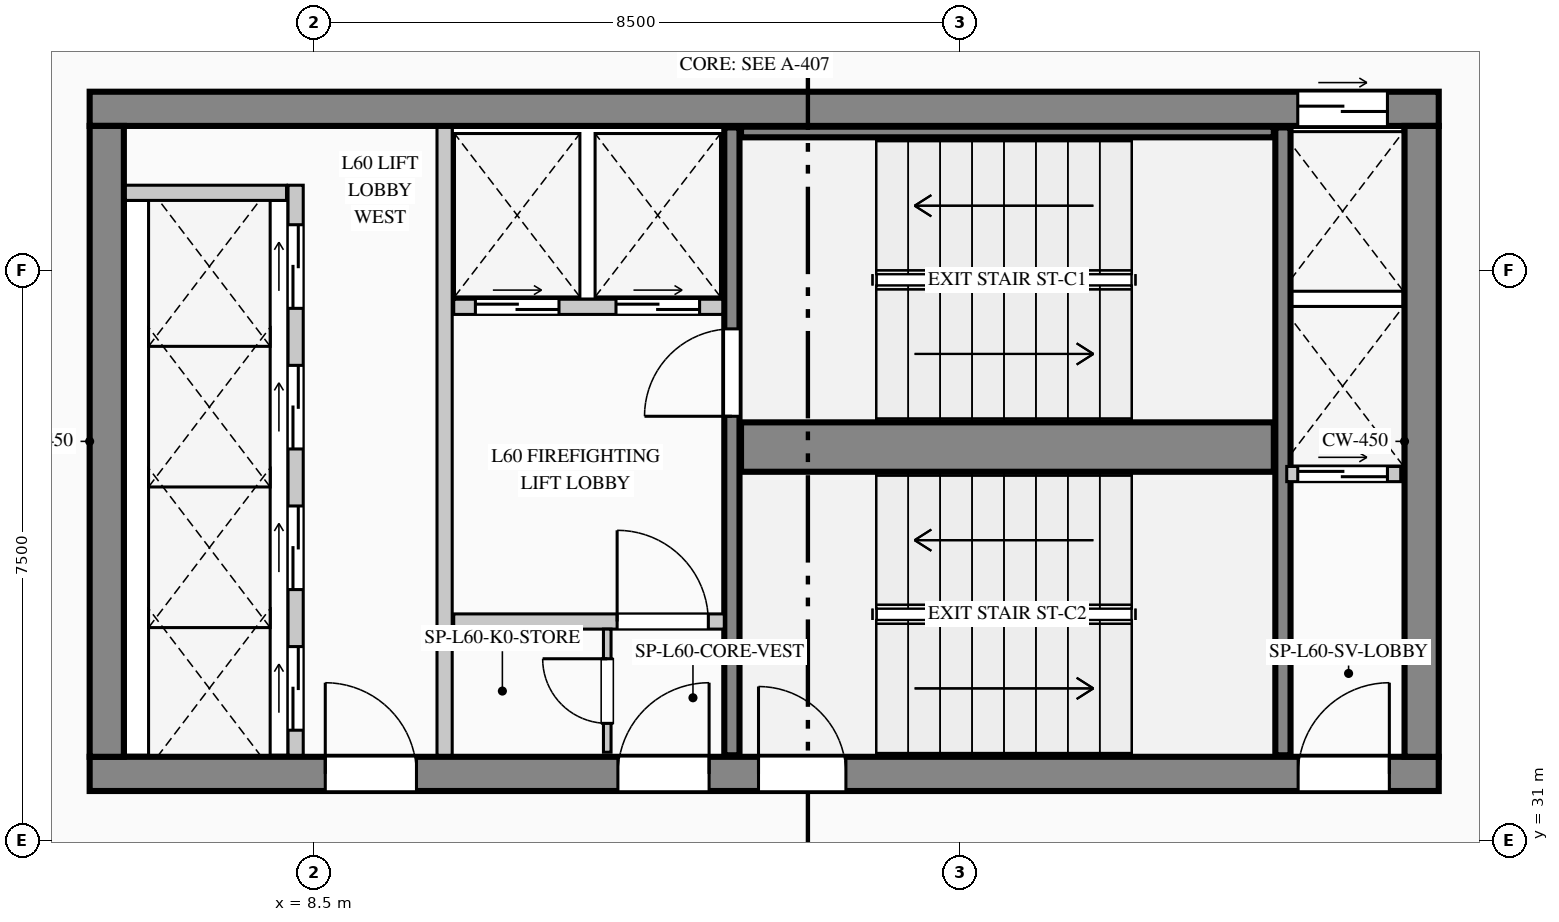
"""IFC4 building model, lengths in metres.
Left out: names, types, materials, properties, quantities, classifications, styles, units other than length and angle.
Written with IfcOpenShell. Run it as: python <this file> out.ifc"""

import sys

from ifc_helpers import new_model, si_unit, direction, frame, frame_2d, origin, place, context, subcontext, project, spatial, rectangle, extrude, element, fill, save


model = new_model("IFC4")
c1 = context("Model", 3, precision=1e-05, world=origin(), true_north=direction((0.0, 1.0)))
c2 = subcontext(c1, "Body", "Model", "MODEL_VIEW")
j1 = project(units=[si_unit("LENGTHUNIT", "METRE"), si_unit("PLANEANGLEUNIT", "RADIAN")], contexts=[c1])
p1 = place(None, origin())
s1 = spatial("IfcSite", under=j1, at=p1, CompositionType="ELEMENT")
p2 = place(p1, origin())
s2 = spatial("IfcBuilding", under=s1, at=p2, CompositionType="ELEMENT")
p3 = place(p2, frame((0.0, 0.0, 250.9)))
s3 = spatial("IfcBuildingStorey", under=s2, at=p3, CompositionType="ELEMENT", Elevation=250.9)
p4 = place(p3, frame((5.55, 40.625, 0.0), z_axis=(0.0, 0.0, 1.0), x_axis=(1.0, 0.0, 0.0)))
e1 = element("IfcWall", 1, at=p4, inside=s3, PredefinedType="SHEAR", context=c2, shape_type="SweptSolid", body=[
    extrude(rectangle(XDim=17.75, YDim=0.45, at=frame_2d((8.875, 0.0))), origin(), (0.0, 0.0, 1.0), 5.8),
])
p5 = place(p4, frame((15.895, 0.0, 0.0)))
e2 = element("IfcOpeningElement", 2, at=p5, cuts=e1, PredefinedType="OPENING", context=c2, shape_type="SweptSolid", body=[
    extrude(rectangle(XDim=1.18, YDim=2.25, at=frame_2d((0.59, 1.125))), frame((0.0, 0.235, 0.0), z_axis=(0.0, -1.0, 0.0), x_axis=(1.0, 0.0, 0.0)), (0.0, 0.0, 1.0), 0.47),
])
p6 = place(p3, frame((5.55, 31.875, 0.0), z_axis=(0.0, 0.0, 1.0), x_axis=(1.0, 0.0, 0.0)))
e3 = element("IfcWall", 3, at=p6, inside=s3, PredefinedType="SHEAR", context=c2, shape_type="SweptSolid", body=[
    extrude(rectangle(XDim=17.75, YDim=0.45, at=frame_2d((8.875, 0.0))), origin(), (0.0, 0.0, 1.0), 5.8),
])
p7 = place(p6, frame((3.1, 0.0, 0.0)))
e4 = element("IfcOpeningElement", 4, at=p7, cuts=e3, PredefinedType="OPENING", context=c2, shape_type="SweptSolid", body=[
    extrude(rectangle(XDim=1.2, YDim=2.2, at=frame_2d((0.6, 1.1))), frame((0.0, 0.235, 0.0), z_axis=(0.0, -1.0, 0.0), x_axis=(1.0, 0.0, 0.0)), (0.0, 0.0, 1.0), 0.47),
])
p8 = place(p6, frame((6.95, 0.0, 0.0)))
e5 = element("IfcOpeningElement", 5, at=p8, cuts=e3, PredefinedType="OPENING", context=c2, shape_type="SweptSolid", body=[
    extrude(rectangle(XDim=1.2, YDim=2.2, at=frame_2d((0.6, 1.1))), frame((0.0, 0.235, 0.0), z_axis=(0.0, -1.0, 0.0), x_axis=(1.0, 0.0, 0.0)), (0.0, 0.0, 1.0), 0.47),
])
p9 = place(p6, frame((8.8, 0.0, 0.0)))
e6 = element("IfcOpeningElement", 6, at=p9, cuts=e3, PredefinedType="OPENING", context=c2, shape_type="SweptSolid", body=[
    extrude(rectangle(XDim=1.15, YDim=2.2, at=frame_2d((0.575, 1.1))), frame((0.0, 0.235, 0.0), z_axis=(0.0, -1.0, 0.0), x_axis=(1.0, 0.0, 0.0)), (0.0, 0.0, 1.0), 0.47),
])
p10 = place(p6, frame((15.9, 0.0, 0.0)))
e7 = element("IfcOpeningElement", 7, at=p10, cuts=e3, PredefinedType="OPENING", context=c2, shape_type="SweptSolid", body=[
    extrude(rectangle(XDim=1.2, YDim=2.2, at=frame_2d((0.6, 1.1))), frame((0.0, 0.235, 0.0), z_axis=(0.0, -1.0, 0.0), x_axis=(1.0, 0.0, 0.0)), (0.0, 0.0, 1.0), 0.47),
])
for number, where, z_axis, x_axis in (
    (8, (5.775, 32.1, 0.0), (0.0, 0.0, 1.0), (0.0, 1.0, 0.0)),
    (9, (23.075, 32.1, 0.0), (0.0, 0.0, 1.0), (0.0, 1.0, 0.0)),
):
    element("IfcWall", number, at=place(p3, frame(where, z_axis=z_axis, x_axis=x_axis)), inside=s3, PredefinedType="SHEAR", context=c2, shape_type="SweptSolid", body=[
        extrude(rectangle(XDim=8.3, YDim=0.45, at=frame_2d((4.15, 0.0))), origin(), (0.0, 0.0, 1.0), 5.8),
    ])
p11 = place(p3, frame((14.0, 32.12, 0.0), z_axis=(0.0, 0.0, 1.0), x_axis=(0.0, 1.0, 0.0)))
e10 = element("IfcWall", 10, at=p11, inside=s3, PredefinedType="SHEAR", context=c2, shape_type="SweptSolid", body=[
    extrude(rectangle(XDim=8.26, YDim=0.2, at=frame_2d((4.13, 0.0))), origin(), (0.0, 0.0, 1.0), 5.8),
])
p12 = place(p11, frame((4.46, 0.0, 0.0)))
e11 = element("IfcOpeningElement", 11, at=p12, cuts=e10, PredefinedType="OPENING", context=c2, shape_type="SweptSolid", body=[
    extrude(rectangle(XDim=1.15, YDim=2.2, at=frame_2d((0.575, 1.1))), frame((0.0, 0.11, 0.0), z_axis=(0.0, -1.0, 0.0), x_axis=(1.0, 0.0, 0.0)), (0.0, 0.0, 1.0), 0.22),
])
p13 = place(p3, frame((14.12, 36.175, 0.0), z_axis=(0.0, 0.0, 1.0), x_axis=(1.0, 0.0, 0.0)))
e12 = element("IfcWall", 12, at=p13, inside=s3, PredefinedType="SHEAR", context=c2, shape_type="SweptSolid", body=[
    extrude(rectangle(XDim=7.01, YDim=0.65, at=frame_2d((3.505, 0.0))), origin(), (0.0, 0.0, 1.0), 5.8),
])
p14 = place(p3, frame((21.25, 32.12, 0.0), z_axis=(0.0, 0.0, 1.0), x_axis=(0.0, 1.0, 0.0)))
e13 = element("IfcWall", 13, at=p14, inside=s3, PredefinedType="SHEAR", context=c2, shape_type="SweptSolid", body=[
    extrude(rectangle(XDim=8.26, YDim=0.2, at=frame_2d((4.13, 0.0))), origin(), (0.0, 0.0, 1.0), 5.8),
])
p15 = place(p3, frame((14.12, 40.32, 0.0), z_axis=(0.0, 0.0, 1.0), x_axis=(1.0, 0.0, 0.0)))
e14 = element("IfcWall", 14, at=p15, inside=s3, PredefinedType="SHEAR", context=c2, shape_type="SweptSolid", body=[
    extrude(rectangle(XDim=7.01, YDim=0.14, at=frame_2d((3.505, 0.0))), origin(), (0.0, 0.0, 1.0), 5.8),
])
p16 = place(p3, frame((8.26, 32.12, 0.0), z_axis=(0.0, 0.0, 1.0), x_axis=(0.0, 1.0, 0.0)))
e15 = element("IfcWall", 15, at=p16, inside=s3, PredefinedType="PARTITIONING", context=c2, shape_type="SweptSolid", body=[
    extrude(rectangle(XDim=7.5, YDim=0.2, at=frame_2d((3.75, 0.0))), origin(), (0.0, 0.0, 1.0), 5.55),
])
p17 = place(p16, frame((0.33, 0.0, 0.0)))
e16 = element("IfcOpeningElement", 16, at=p17, cuts=e15, PredefinedType="OPENING", context=c2, shape_type="SweptSolid", body=[
    extrude(rectangle(XDim=1.1, YDim=2.2, at=frame_2d((0.55, 1.1))), frame((0.0, 0.11, 0.0), z_axis=(0.0, -1.0, 0.0), x_axis=(1.0, 0.0, 0.0)), (0.0, 0.0, 1.0), 0.22),
])
p18 = place(p16, frame((2.18, 0.0, 0.0)))
e17 = element("IfcOpeningElement", 17, at=p18, cuts=e15, PredefinedType="OPENING", context=c2, shape_type="SweptSolid", body=[
    extrude(rectangle(XDim=1.1, YDim=2.2, at=frame_2d((0.55, 1.1))), frame((0.0, 0.11, 0.0), z_axis=(0.0, -1.0, 0.0), x_axis=(1.0, 0.0, 0.0)), (0.0, 0.0, 1.0), 0.22),
])
p19 = place(p16, frame((4.03, 0.0, 0.0)))
e18 = element("IfcOpeningElement", 18, at=p19, cuts=e15, PredefinedType="OPENING", context=c2, shape_type="SweptSolid", body=[
    extrude(rectangle(XDim=1.1, YDim=2.2, at=frame_2d((0.55, 1.1))), frame((0.0, 0.11, 0.0), z_axis=(0.0, -1.0, 0.0), x_axis=(1.0, 0.0, 0.0)), (0.0, 0.0, 1.0), 0.22),
])
p20 = place(p16, frame((5.88, 0.0, 0.0)))
e19 = element("IfcOpeningElement", 19, at=p20, cuts=e15, PredefinedType="OPENING", context=c2, shape_type="SweptSolid", body=[
    extrude(rectangle(XDim=1.1, YDim=2.2, at=frame_2d((0.55, 1.1))), frame((0.0, 0.11, 0.0), z_axis=(0.0, -1.0, 0.0), x_axis=(1.0, 0.0, 0.0)), (0.0, 0.0, 1.0), 0.22),
])
p21 = place(p3, frame((6.02, 39.52, 0.0), z_axis=(0.0, 0.0, 1.0), x_axis=(1.0, 0.0, 0.0)))
e20 = element("IfcWall", 20, at=p21, inside=s3, PredefinedType="PARTITIONING", context=c2, shape_type="SweptSolid", body=[
    extrude(rectangle(XDim=2.12, YDim=0.2, at=frame_2d((1.06, 0.0))), origin(), (0.0, 0.0, 1.0), 5.55),
])
p22 = place(p3, frame((10.22, 32.12, 0.0), z_axis=(0.0, 0.0, 1.0), x_axis=(0.0, 1.0, 0.0)))
e21 = element("IfcWall", 21, at=p22, inside=s3, PredefinedType="PARTITIONING", context=c2, shape_type="SweptSolid", body=[
    extrude(rectangle(XDim=8.26, YDim=0.2, at=frame_2d((4.13, 0.0))), origin(), (0.0, 0.0, 1.0), 5.55),
])
p23 = place(p3, frame((10.34, 38.02, 0.0), z_axis=(0.0, 0.0, 1.0), x_axis=(1.0, 0.0, 0.0)))
e22 = element("IfcWall", 22, at=p23, inside=s3, PredefinedType="PARTITIONING", context=c2, shape_type="SweptSolid", body=[
    extrude(rectangle(XDim=3.54, YDim=0.2, at=frame_2d((1.77, 0.0))), origin(), (0.0, 0.0, 1.0), 5.55),
])
p24 = place(p23, frame((0.285, 0.0, 0.0)))
e23 = element("IfcOpeningElement", 23, at=p24, cuts=e22, PredefinedType="OPENING", context=c2, shape_type="SweptSolid", body=[
    extrude(rectangle(XDim=1.1, YDim=2.2, at=frame_2d((0.55, 1.1))), frame((0.0, 0.11, 0.0), z_axis=(0.0, -1.0, 0.0), x_axis=(1.0, 0.0, 0.0)), (0.0, 0.0, 1.0), 0.22),
])
p25 = place(p23, frame((2.135, 0.0, 0.0)))
e24 = element("IfcOpeningElement", 24, at=p25, cuts=e22, PredefinedType="OPENING", context=c2, shape_type="SweptSolid", body=[
    extrude(rectangle(XDim=1.1, YDim=2.2, at=frame_2d((0.55, 1.1))), frame((0.0, 0.11, 0.0), z_axis=(0.0, -1.0, 0.0), x_axis=(1.0, 0.0, 0.0)), (0.0, 0.0, 1.0), 0.22),
])
p26 = place(p3, frame((10.34, 33.88, 0.0), z_axis=(0.0, 0.0, 1.0), x_axis=(1.0, 0.0, 0.0)))
e25 = element("IfcWall", 25, at=p26, inside=s3, PredefinedType="PARTITIONING", context=c2, shape_type="SweptSolid", body=[
    extrude(rectangle(XDim=3.56, YDim=0.2, at=frame_2d((1.78, 0.0))), origin(), (0.0, 0.0, 1.0), 5.55),
])
p27 = place(p26, frame((2.15, 0.0, 0.0)))
e26 = element("IfcOpeningElement", 26, at=p27, cuts=e25, PredefinedType="OPENING", context=c2, shape_type="SweptSolid", body=[
    extrude(rectangle(XDim=1.2, YDim=2.2, at=frame_2d((0.6, 1.1))), frame((0.0, 0.11, 0.0), z_axis=(0.0, -1.0, 0.0), x_axis=(1.0, 0.0, 0.0)), (0.0, 0.0, 1.0), 0.22),
])
p28 = place(p3, frame((12.36, 32.16, 0.0), z_axis=(0.0, 0.0, 1.0), x_axis=(0.0, 1.0, 0.0)))
e27 = element("IfcWall", 27, at=p28, inside=s3, PredefinedType="PARTITIONING", context=c2, shape_type="SweptSolid", body=[
    extrude(rectangle(XDim=1.62, YDim=0.1, at=frame_2d((0.81, 0.0))), origin(), (0.0, 0.0, 1.0), 5.55),
])
p29 = place(p28, frame((0.38, 0.0, 0.0)))
e28 = element("IfcOpeningElement", 28, at=p29, cuts=e27, PredefinedType="OPENING", context=c2, shape_type="SweptSolid", body=[
    extrude(rectangle(XDim=0.85, YDim=2.1, at=frame_2d((0.425, 1.05))), frame((0.0, 0.06, 0.0), z_axis=(0.0, -1.0, 0.0), x_axis=(1.0, 0.0, 0.0)), (0.0, 0.0, 1.0), 0.12),
])
p30 = place(p3, frame((21.3, 35.82, 0.0), z_axis=(0.0, 0.0, 1.0), x_axis=(1.0, 0.0, 0.0)))
e29 = element("IfcWall", 29, at=p30, inside=s3, PredefinedType="PARTITIONING", context=c2, shape_type="SweptSolid", body=[
    extrude(rectangle(XDim=1.5, YDim=0.2, at=frame_2d((0.75, 0.0))), origin(), (0.0, 0.0, 1.0), 5.55),
])
p31 = place(p30, frame((0.145, 0.0, 0.0)))
e30 = element("IfcOpeningElement", 30, at=p31, cuts=e29, PredefinedType="OPENING", context=c2, shape_type="SweptSolid", body=[
    extrude(rectangle(XDim=1.18, YDim=2.25, at=frame_2d((0.59, 1.125))), frame((0.0, 0.11, 0.0), z_axis=(0.0, -1.0, 0.0), x_axis=(1.0, 0.0, 0.0)), (0.0, 0.0, 1.0), 0.22),
])
p32 = place(p7, origin())
e31 = element("IfcDoor", 31, at=p32, inside=s3, OperationType="SINGLE_SWING_LEFT", PredefinedType="DOOR", context=c2, shape_type="SweptSolid", body=[
    extrude(rectangle(XDim=1.2, YDim=2.2, at=frame_2d((0.6, 1.1))), frame((0.0, 0.025, 0.0), z_axis=(0.0, -1.0, 0.0), x_axis=(1.0, 0.0, 0.0)), (0.0, 0.0, 1.0), 0.05),
])
fill(e4, e31)
p33 = place(p8, origin())
e32 = element("IfcDoor", 32, at=p33, inside=s3, OperationType="SINGLE_SWING_RIGHT", PredefinedType="DOOR", context=c2, shape_type="SweptSolid", body=[
    extrude(rectangle(XDim=1.2, YDim=2.2, at=frame_2d((0.6, 1.1))), frame((0.0, 0.025, 0.0), z_axis=(0.0, -1.0, 0.0), x_axis=(1.0, 0.0, 0.0)), (0.0, 0.0, 1.0), 0.05),
])
fill(e5, e32)
p34 = place(p9, origin())
e33 = element("IfcDoor", 33, at=p34, inside=s3, OperationType="SINGLE_SWING_LEFT", PredefinedType="DOOR", context=c2, shape_type="SweptSolid", body=[
    extrude(rectangle(XDim=1.15, YDim=2.2, at=frame_2d((0.575, 1.1))), frame((0.0, 0.025, 0.0), z_axis=(0.0, -1.0, 0.0), x_axis=(1.0, 0.0, 0.0)), (0.0, 0.0, 1.0), 0.05),
])
fill(e6, e33)
p35 = place(p10, origin())
e34 = element("IfcDoor", 34, at=p35, inside=s3, OperationType="SINGLE_SWING_RIGHT", PredefinedType="DOOR", context=c2, shape_type="SweptSolid", body=[
    extrude(rectangle(XDim=1.2, YDim=2.2, at=frame_2d((0.6, 1.1))), frame((0.0, 0.025, 0.0), z_axis=(0.0, -1.0, 0.0), x_axis=(1.0, 0.0, 0.0)), (0.0, 0.0, 1.0), 0.05),
])
fill(e7, e34)
p36 = place(p27, origin())
e35 = element("IfcDoor", 35, at=p36, inside=s3, OperationType="SINGLE_SWING_LEFT", PredefinedType="DOOR", context=c2, shape_type="SweptSolid", body=[
    extrude(rectangle(XDim=1.2, YDim=2.2, at=frame_2d((0.6, 1.1))), frame((0.0, 0.025, 0.0), z_axis=(0.0, -1.0, 0.0), x_axis=(1.0, 0.0, 0.0)), (0.0, 0.0, 1.0), 0.05),
])
fill(e26, e35)
p37 = place(p29, origin())
e36 = element("IfcDoor", 36, at=p37, inside=s3, OperationType="SINGLE_SWING_RIGHT", PredefinedType="DOOR", context=c2, shape_type="SweptSolid", body=[
    extrude(rectangle(XDim=0.85, YDim=2.1, at=frame_2d((0.425, 1.05))), frame((0.0, 0.025, 0.0), z_axis=(0.0, -1.0, 0.0), x_axis=(1.0, 0.0, 0.0)), (0.0, 0.0, 1.0), 0.05),
])
fill(e28, e36)
p38 = place(p12, origin())
e37 = element("IfcDoor", 37, at=p38, inside=s3, OperationType="SINGLE_SWING_LEFT", PredefinedType="DOOR", context=c2, shape_type="SweptSolid", body=[
    extrude(rectangle(XDim=1.15, YDim=2.2, at=frame_2d((0.575, 1.1))), frame((0.0, 0.025, 0.0), z_axis=(0.0, -1.0, 0.0), x_axis=(1.0, 0.0, 0.0)), (0.0, 0.0, 1.0), 0.05),
])
fill(e11, e37)
p39 = place(p17, origin())
e38 = element("IfcDoor", 38, at=p39, inside=s3, OperationType="DOUBLE_DOOR_SLIDING", PredefinedType="DOOR", context=c2, shape_type="SweptSolid", body=[
    extrude(rectangle(XDim=1.1, YDim=2.2, at=frame_2d((0.55, 1.1))), frame((0.0, 0.025, 0.0), z_axis=(0.0, -1.0, 0.0), x_axis=(1.0, 0.0, 0.0)), (0.0, 0.0, 1.0), 0.05),
])
fill(e16, e38)
p40 = place(p18, origin())
e39 = element("IfcDoor", 39, at=p40, inside=s3, OperationType="DOUBLE_DOOR_SLIDING", PredefinedType="DOOR", context=c2, shape_type="SweptSolid", body=[
    extrude(rectangle(XDim=1.1, YDim=2.2, at=frame_2d((0.55, 1.1))), frame((0.0, 0.025, 0.0), z_axis=(0.0, -1.0, 0.0), x_axis=(1.0, 0.0, 0.0)), (0.0, 0.0, 1.0), 0.05),
])
fill(e17, e39)
p41 = place(p19, origin())
e40 = element("IfcDoor", 40, at=p41, inside=s3, OperationType="DOUBLE_DOOR_SLIDING", PredefinedType="DOOR", context=c2, shape_type="SweptSolid", body=[
    extrude(rectangle(XDim=1.1, YDim=2.2, at=frame_2d((0.55, 1.1))), frame((0.0, 0.025, 0.0), z_axis=(0.0, -1.0, 0.0), x_axis=(1.0, 0.0, 0.0)), (0.0, 0.0, 1.0), 0.05),
])
fill(e18, e40)
p42 = place(p20, origin())
e41 = element("IfcDoor", 41, at=p42, inside=s3, OperationType="DOUBLE_DOOR_SLIDING", PredefinedType="DOOR", context=c2, shape_type="SweptSolid", body=[
    extrude(rectangle(XDim=1.1, YDim=2.2, at=frame_2d((0.55, 1.1))), frame((0.0, 0.025, 0.0), z_axis=(0.0, -1.0, 0.0), x_axis=(1.0, 0.0, 0.0)), (0.0, 0.0, 1.0), 0.05),
])
fill(e19, e41)
p43 = place(p24, origin())
e42 = element("IfcDoor", 42, at=p43, inside=s3, OperationType="DOUBLE_DOOR_SLIDING", PredefinedType="DOOR", context=c2, shape_type="SweptSolid", body=[
    extrude(rectangle(XDim=1.1, YDim=2.2, at=frame_2d((0.55, 1.1))), frame((0.0, 0.025, 0.0), z_axis=(0.0, -1.0, 0.0), x_axis=(1.0, 0.0, 0.0)), (0.0, 0.0, 1.0), 0.05),
])
fill(e23, e42)
p44 = place(p25, origin())
e43 = element("IfcDoor", 43, at=p44, inside=s3, OperationType="DOUBLE_DOOR_SLIDING", PredefinedType="DOOR", context=c2, shape_type="SweptSolid", body=[
    extrude(rectangle(XDim=1.1, YDim=2.2, at=frame_2d((0.55, 1.1))), frame((0.0, 0.025, 0.0), z_axis=(0.0, -1.0, 0.0), x_axis=(1.0, 0.0, 0.0)), (0.0, 0.0, 1.0), 0.05),
])
fill(e24, e43)
p45 = place(p5, origin())
e44 = element("IfcDoor", 44, at=p45, inside=s3, OperationType="DOUBLE_DOOR_SLIDING", PredefinedType="DOOR", context=c2, shape_type="SweptSolid", body=[
    extrude(rectangle(XDim=1.18, YDim=2.25, at=frame_2d((0.59, 1.125))), frame((0.0, 0.025, 0.0), z_axis=(0.0, -1.0, 0.0), x_axis=(1.0, 0.0, 0.0)), (0.0, 0.0, 1.0), 0.05),
])
fill(e2, e44)
p46 = place(p31, origin())
e45 = element("IfcDoor", 45, at=p46, inside=s3, OperationType="DOUBLE_DOOR_SLIDING", PredefinedType="DOOR", context=c2, shape_type="SweptSolid", body=[
    extrude(rectangle(XDim=1.18, YDim=2.25, at=frame_2d((0.59, 1.125))), frame((0.0, 0.025, 0.0), z_axis=(0.0, -1.0, 0.0), x_axis=(1.0, 0.0, 0.0)), (0.0, 0.0, 1.0), 0.05),
])
fill(e30, e45)
save(model, sys.argv[1])
